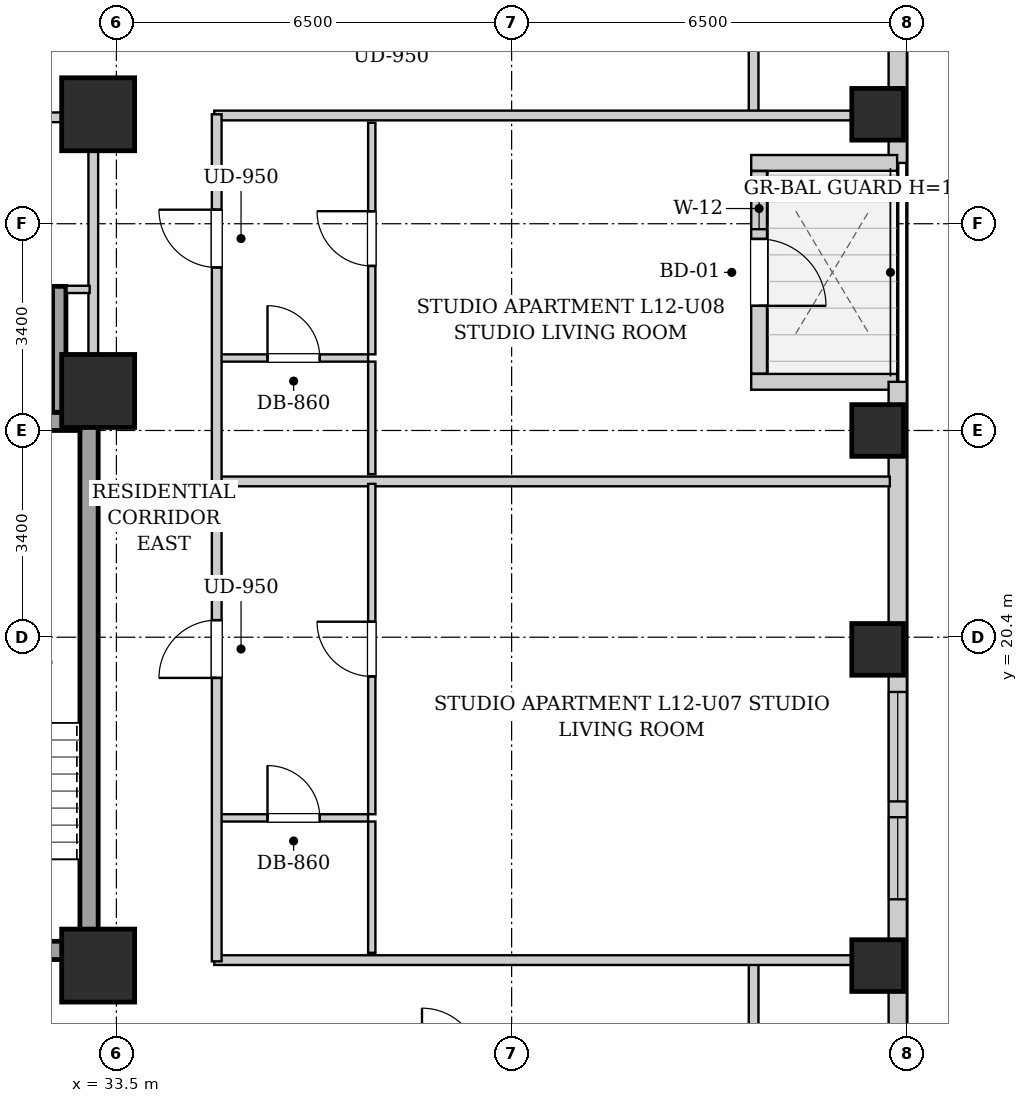
"""IFC4 building model, lengths in metres.
Left out: names, types, materials, properties, quantities, classifications, styles, units other than length and angle.
Written with IfcOpenShell. Run it as: python <this file> out.ifc"""

import sys

from ifc_helpers import new_model, si_unit, direction, frame, frame_2d, origin, origin_2d, place, context, subcontext, project, spatial, rectangle, extrude, element, fill, save


model = new_model("IFC4")
c1 = context("Model", 3, precision=1e-05, world=origin(), true_north=direction((0.0, 1.0)))
c2 = subcontext(c1, "Body", "Model", "MODEL_VIEW")
j1 = project(units=[si_unit("LENGTHUNIT", "METRE"), si_unit("PLANEANGLEUNIT", "RADIAN")], contexts=[c1])
p1 = place(None, origin())
s1 = spatial("IfcSite", under=j1, at=p1, CompositionType="ELEMENT")
p2 = place(p1, origin())
s2 = spatial("IfcBuilding", under=s1, at=p2, CompositionType="ELEMENT")
p3 = place(p2, frame((0.0, 0.0, 48.2)))
s3 = spatial("IfcBuildingStorey", under=s2, at=p3, CompositionType="ELEMENT", Elevation=48.2)
for number, where, z_axis, x_axis in (
    (1, (46.02, 15.0, 0.0), (0.0, 0.0, 1.0), (1.0, 0.0, 0.0)),
    (2, (46.02, 20.2, 0.0), (0.0, 0.0, 1.0), (1.0, 0.0, 0.0)),
    (3, (46.02, 23.8, 0.0), (0.0, 0.0, 1.0), (1.0, 0.0, 0.0)),
    (4, (46.02, 29.0, 0.0), (0.0, 0.0, 1.0), (1.0, 0.0, 0.0)),
):
    element("IfcColumn", number, at=place(p3, frame(where, z_axis=z_axis, x_axis=x_axis)), inside=s3, PredefinedType="COLUMN", context=c2, shape_type="SweptSolid", body=[
        extrude(rectangle(XDim=0.85, YDim=0.85, at=origin_2d()), origin(), (0.0, 0.0, 1.0), 3.2),
    ])
for number, where, z_axis, x_axis in (
    (5, (33.2, 15.0, 0.0), (0.0, 0.0, 1.0), (1.0, 0.0, 0.0)),
    (6, (33.2, 29.0, 0.0), (0.0, 0.0, 1.0), (1.0, 0.0, 0.0)),
    (7, (33.2, 24.45, 0.0), (0.0, 0.0, 1.0), (1.0, 0.0, 0.0)),
):
    element("IfcColumn", number, at=place(p3, frame(where, z_axis=z_axis, x_axis=x_axis)), inside=s3, PredefinedType="COLUMN", context=c2, shape_type="SweptSolid", body=[
        extrude(rectangle(XDim=1.2, YDim=1.2, at=origin_2d()), origin(), (0.0, 0.0, 1.0), 3.2),
    ])
p4 = place(p3, frame((46.35, 45.1, 0.0), z_axis=(0.0, 0.0, 1.0), x_axis=(0.0, -1.0, 0.0)))
e8 = element("IfcWall", 8, at=p4, inside=s3, PredefinedType="SOLIDWALL", context=c2, shape_type="SweptSolid", body=[
    extrude(rectangle(XDim=16.9, YDim=0.3, at=frame_2d((8.45, 0.0))), origin(), (0.0, 0.0, 1.0), 1.975),
])
p5 = place(p4, frame((3.715, 0.0, 0.55)))
e9 = element("IfcOpeningElement", 9, at=p5, cuts=e8, PredefinedType="OPENING", context=c2, shape_type="SweptSolid", body=[
    extrude(rectangle(XDim=1.8, YDim=1.2, at=frame_2d((0.9, 0.6))), frame((0.0, 0.16, 0.0), z_axis=(0.0, -1.0, 0.0), x_axis=(1.0, 0.0, 0.0)), (0.0, 0.0, 1.0), 0.32),
])
p6 = place(p4, frame((1.185, 0.0, 0.55)))
e10 = element("IfcOpeningElement", 10, at=p6, cuts=e8, PredefinedType="OPENING", context=c2, shape_type="SweptSolid", body=[
    extrude(rectangle(XDim=1.35, YDim=1.2, at=frame_2d((0.675, 0.6))), frame((0.0, 0.16, 0.0), z_axis=(0.0, -1.0, 0.0), x_axis=(1.0, 0.0, 0.0)), (0.0, 0.0, 1.0), 0.32),
])
p7 = place(p3, frame((46.34, 28.2, 0.0), z_axis=(0.0, 0.0, 1.0), x_axis=(-1.0, 0.0, 0.0)))
e11 = element("IfcWall", 11, at=p7, inside=s3, PredefinedType="SOLIDWALL", context=c2, shape_type="SweptSolid", body=[
    extrude(rectangle(XDim=2.4, YDim=0.26, at=frame_2d((1.2, 0.0))), origin(), (0.0, 0.0, 1.0), 2.94),
])
p8 = place(p3, frame((44.07, 28.066, 0.0), z_axis=(0.0, 0.0, 1.0), x_axis=(0.0, -1.0, 0.0)))
e12 = element("IfcWall", 12, at=p8, inside=s3, PredefinedType="SOLIDWALL", context=c2, shape_type="SweptSolid", body=[
    extrude(rectangle(XDim=3.332, YDim=0.26, at=frame_2d((1.666, 0.0))), origin(), (0.0, 0.0, 1.0), 2.94),
])
p9 = place(p8, frame((1.116, 0.0, 0.0)))
e13 = element("IfcOpeningElement", 13, at=p9, cuts=e12, PredefinedType="OPENING", context=c2, shape_type="SweptSolid", body=[
    extrude(rectangle(XDim=1.1, YDim=2.0, at=frame_2d((0.55, 1.0))), frame((0.0, 0.14, 0.0), z_axis=(0.0, -1.0, 0.0), x_axis=(1.0, 0.0, 0.0)), (0.0, 0.0, 1.0), 0.28),
])
p10 = place(p8, frame((0.276, 0.0, 0.55)))
e14 = element("IfcOpeningElement", 14, at=p10, cuts=e12, PredefinedType="OPENING", context=c2, shape_type="SweptSolid", body=[
    extrude(rectangle(XDim=0.68, YDim=1.2, at=frame_2d((0.34, 0.6))), frame((0.0, 0.14, 0.0), z_axis=(0.0, -1.0, 0.0), x_axis=(1.0, 0.0, 0.0)), (0.0, 0.0, 1.0), 0.28),
])
p11 = place(p3, frame((43.94, 24.6, 0.0), z_axis=(0.0, 0.0, 1.0), x_axis=(1.0, 0.0, 0.0)))
e15 = element("IfcWall", 15, at=p11, inside=s3, PredefinedType="SOLIDWALL", context=c2, shape_type="SweptSolid", body=[
    extrude(rectangle(XDim=2.4, YDim=0.26, at=frame_2d((1.2, 0.0))), origin(), (0.0, 0.0, 1.0), 2.94),
])
p12 = place(p3, frame((46.35, 24.6, 0.0), z_axis=(0.0, 0.0, 1.0), x_axis=(0.0, -1.0, 0.0)))
e16 = element("IfcWall", 16, at=p12, inside=s3, PredefinedType="SOLIDWALL", context=c2, shape_type="SweptSolid", body=[
    extrude(rectangle(XDim=22.1, YDim=0.3, at=frame_2d((11.05, 0.0))), origin(), (0.0, 0.0, 1.0), 1.975),
])
p13 = place(p12, frame((17.141, 0.0, 0.55)))
e17 = element("IfcOpeningElement", 17, at=p13, cuts=e16, PredefinedType="OPENING", context=c2, shape_type="SweptSolid", body=[
    extrude(rectangle(XDim=1.8, YDim=1.2, at=frame_2d((0.9, 0.6))), frame((0.0, 0.16, 0.0), z_axis=(0.0, -1.0, 0.0), x_axis=(1.0, 0.0, 0.0)), (0.0, 0.0, 1.0), 0.32),
])
p14 = place(p12, frame((14.465, 0.0, 0.55)))
e18 = element("IfcOpeningElement", 18, at=p14, cuts=e16, PredefinedType="OPENING", context=c2, shape_type="SweptSolid", body=[
    extrude(rectangle(XDim=1.35, YDim=1.2, at=frame_2d((0.675, 0.6))), frame((0.0, 0.16, 0.0), z_axis=(0.0, -1.0, 0.0), x_axis=(1.0, 0.0, 0.0)), (0.0, 0.0, 1.0), 0.32),
])
p15 = place(p12, frame((5.1, 0.0, 0.55)))
e19 = element("IfcOpeningElement", 19, at=p15, cuts=e16, PredefinedType="OPENING", context=c2, shape_type="SweptSolid", body=[
    extrude(rectangle(XDim=1.8, YDim=1.2, at=frame_2d((0.9, 0.6))), frame((0.0, 0.16, 0.0), z_axis=(0.0, -1.0, 0.0), x_axis=(1.0, 0.0, 0.0)), (0.0, 0.0, 1.0), 0.32),
])
p16 = place(p12, frame((7.16, 0.0, 0.55)))
e20 = element("IfcOpeningElement", 20, at=p16, cuts=e16, PredefinedType="OPENING", context=c2, shape_type="SweptSolid", body=[
    extrude(rectangle(XDim=1.35, YDim=1.2, at=frame_2d((0.675, 0.6))), frame((0.0, 0.16, 0.0), z_axis=(0.0, -1.0, 0.0), x_axis=(1.0, 0.0, 0.0)), (0.0, 0.0, 1.0), 0.32),
])
p17 = place(p3, frame((33.05, 15.1, 0.0), z_axis=(0.0, 0.0, 1.0), x_axis=(0.0, 1.0, 0.0)))
e21 = element("IfcWall", 21, at=p17, inside=s3, PredefinedType="SHEAR", context=c2, shape_type="SweptSolid", body=[
    extrude(rectangle(XDim=9.0, YDim=0.3, at=frame_2d((4.5, 0.0))), origin(), (0.0, 0.0, 1.0), 2.94),
])
p18 = place(p3, frame((30.05, 23.95, 0.0), z_axis=(0.0, 0.0, 1.0), x_axis=(1.0, 0.0, 0.0)))
e22 = element("IfcWall", 22, at=p18, inside=s3, PredefinedType="SHEAR", context=c2, shape_type="SweptSolid", body=[
    extrude(rectangle(XDim=2.85, YDim=0.3, at=frame_2d((1.425, 0.0))), origin(), (0.0, 0.0, 1.0), 2.94),
])
p19 = place(p3, frame((30.05, 15.25, 0.0), z_axis=(0.0, 0.0, 1.0), x_axis=(1.0, 0.0, 0.0)))
e23 = element("IfcWall", 23, at=p19, inside=s3, PredefinedType="SHEAR", context=c2, shape_type="SweptSolid", body=[
    extrude(rectangle(XDim=2.85, YDim=0.3, at=frame_2d((1.425, 0.0))), origin(), (0.0, 0.0, 1.0), 2.94),
])
p20 = place(p19, frame((0.86, 0.0, 0.0)))
e24 = element("IfcOpeningElement", 24, at=p20, cuts=e23, PredefinedType="OPENING", context=c2, shape_type="SweptSolid", body=[
    extrude(rectangle(XDim=1.1, YDim=2.05, at=frame_2d((0.55, 1.025))), frame((0.0, 0.16, 0.0), z_axis=(0.0, -1.0, 0.0), x_axis=(1.0, 0.0, 0.0)), (0.0, 0.0, 1.0), 0.32),
])
p21 = place(p3, frame((32.56, 24.1, 0.0), z_axis=(0.0, 0.0, 1.0), x_axis=(0.0, 1.0, 0.0)))
e25 = element("IfcWall", 25, at=p21, inside=s3, PredefinedType="SHEAR", context=c2, shape_type="SweptSolid", body=[
    extrude(rectangle(XDim=2.07, YDim=0.22, at=frame_2d((1.035, 0.0))), origin(), (0.0, 0.0, 1.0), 2.94),
])
p22 = place(p3, frame((33.12, 24.12, 0.0), z_axis=(0.0, 0.0, 1.0), x_axis=(0.0, 1.0, 0.0)))
e26 = element("IfcWall", 26, at=p22, inside=s3, PredefinedType="PARTITIONING", context=c2, shape_type="SweptSolid", body=[
    extrude(rectangle(XDim=4.76, YDim=0.16, at=frame_2d((2.38, 0.0))), origin(), (0.0, 0.0, 1.0), 2.275),
])
p23 = place(p3, frame((32.68, 26.12, 0.0), z_axis=(0.0, 0.0, 1.0), x_axis=(1.0, 0.0, 0.0)))
e27 = element("IfcWall", 27, at=p23, inside=s3, PredefinedType="PARTITIONING", context=c2, shape_type="SweptSolid", body=[
    extrude(rectangle(XDim=0.38, YDim=0.12, at=frame_2d((0.19, 0.0))), origin(), (0.0, 0.0, 1.0), 2.94),
])
p24 = place(p3, frame((30.08, 28.95, 0.0), z_axis=(0.0, 0.0, 1.0), x_axis=(1.0, 0.0, 0.0)))
e28 = element("IfcWall", 28, at=p24, inside=s3, PredefinedType="PARTITIONING", context=c2, shape_type="SweptSolid", body=[
    extrude(rectangle(XDim=2.96, YDim=0.16, at=frame_2d((1.48, 0.0))), origin(), (0.0, 0.0, 1.0), 2.94),
])
p25 = place(p24, frame((1.045, 0.0, 0.0)))
e29 = element("IfcOpeningElement", 29, at=p25, cuts=e28, PredefinedType="OPENING", context=c2, shape_type="SweptSolid", body=[
    extrude(rectangle(XDim=0.86, YDim=2.05, at=frame_2d((0.43, 1.025))), frame((0.0, 0.09, 0.0), z_axis=(0.0, -1.0, 0.0), x_axis=(1.0, 0.0, 0.0)), (0.0, 0.0, 1.0), 0.18),
])
for number, where, z_axis, x_axis in (
    (30, (43.98, 13.35, 0.0), (0.0, 0.0, 1.0), (0.0, 1.0, 0.0)),
    (31, (43.98, 28.98, 0.0), (0.0, 0.0, 1.0), (0.0, 1.0, 0.0)),
):
    element("IfcWall", number, at=place(p3, frame(where, z_axis=z_axis, x_axis=x_axis)), inside=s3, PredefinedType="PARTITIONING", context=c2, shape_type="SweptSolid", body=[
        extrude(rectangle(XDim=1.74, YDim=0.16, at=frame_2d((0.87, 0.0))), origin(), (0.0, 0.0, 1.0), 2.94),
    ])
for number, where, z_axis, x_axis in (
    (32, (35.11, 15.09, 0.0), (0.0, 0.0, 1.0), (1.0, 0.0, 0.0)),
    (33, (35.11, 28.98, 0.0), (0.0, 0.0, 1.0), (1.0, 0.0, 0.0)),
):
    element("IfcWall", number, at=place(p3, frame(where, z_axis=z_axis, x_axis=x_axis)), inside=s3, PredefinedType="PARTITIONING", context=c2, shape_type="SweptSolid", body=[
        extrude(rectangle(XDim=11.11, YDim=0.16, at=frame_2d((5.555, 0.0))), origin(), (0.0, 0.0, 1.0), 2.232),
    ])
p26 = place(p3, frame((35.19, 22.962, 0.0), z_axis=(0.0, 0.0, 1.0), x_axis=(1.0, 0.0, 0.0)))
e34 = element("IfcWall", 34, at=p26, inside=s3, PredefinedType="PARTITIONING", context=c2, shape_type="SweptSolid", body=[
    extrude(rectangle(XDim=11.03, YDim=0.16, at=frame_2d((5.515, 0.0))), origin(), (0.0, 0.0, 1.0), 2.94),
])
p27 = place(p3, frame((35.19, 17.429, 0.0), z_axis=(0.0, 0.0, 1.0), x_axis=(1.0, 0.0, 0.0)))
e35 = element("IfcWall", 35, at=p27, inside=s3, PredefinedType="PARTITIONING", context=c2, shape_type="SweptSolid", body=[
    extrude(rectangle(XDim=2.45, YDim=0.12, at=frame_2d((1.225, 0.0))), origin(), (0.0, 0.0, 1.0), 2.94),
])
p28 = place(p27, frame((0.795, 0.0, 0.0)))
e36 = element("IfcOpeningElement", 36, at=p28, cuts=e35, PredefinedType="OPENING", context=c2, shape_type="SweptSolid", body=[
    extrude(rectangle(XDim=0.86, YDim=2.05, at=frame_2d((0.43, 1.025))), frame((0.0, 0.07, 0.0), z_axis=(0.0, -1.0, 0.0), x_axis=(1.0, 0.0, 0.0)), (0.0, 0.0, 1.0), 0.14),
])
p29 = place(p3, frame((37.7, 15.21, 0.0), z_axis=(0.0, 0.0, 1.0), x_axis=(0.0, 1.0, 0.0)))
e37 = element("IfcWall", 37, at=p29, inside=s3, PredefinedType="PARTITIONING", context=c2, shape_type="SweptSolid", body=[
    extrude(rectangle(XDim=2.159, YDim=0.12, at=frame_2d((1.08, 0.0))), origin(), (0.0, 0.0, 1.0), 2.94),
])
p30 = place(p3, frame((37.7, 17.489, 0.0), z_axis=(0.0, 0.0, 1.0), x_axis=(0.0, 1.0, 0.0)))
e38 = element("IfcWall", 38, at=p30, inside=s3, PredefinedType="PARTITIONING", context=c2, shape_type="SweptSolid", body=[
    extrude(rectangle(XDim=5.433, YDim=0.12, at=frame_2d((2.717, 0.0))), origin(), (0.0, 0.0, 1.0), 2.94),
])
p31 = place(p30, frame((2.266, 0.0, 0.0)))
e39 = element("IfcOpeningElement", 39, at=p31, cuts=e38, PredefinedType="OPENING", context=c2, shape_type="SweptSolid", body=[
    extrude(rectangle(XDim=0.9, YDim=2.05, at=frame_2d((0.45, 1.025))), frame((0.0, 0.07, 0.0), z_axis=(0.0, -1.0, 0.0), x_axis=(1.0, 0.0, 0.0)), (0.0, 0.0, 1.0), 0.14),
])
p32 = place(p3, frame((35.19, 24.992, 0.0), z_axis=(0.0, 0.0, 1.0), x_axis=(1.0, 0.0, 0.0)))
e40 = element("IfcWall", 40, at=p32, inside=s3, PredefinedType="PARTITIONING", context=c2, shape_type="SweptSolid", body=[
    extrude(rectangle(XDim=2.45, YDim=0.12, at=frame_2d((1.225, 0.0))), origin(), (0.0, 0.0, 1.0), 2.94),
])
p33 = place(p32, frame((0.795, 0.0, 0.0)))
e41 = element("IfcOpeningElement", 41, at=p33, cuts=e40, PredefinedType="OPENING", context=c2, shape_type="SweptSolid", body=[
    extrude(rectangle(XDim=0.86, YDim=2.05, at=frame_2d((0.43, 1.025))), frame((0.0, 0.07, 0.0), z_axis=(0.0, -1.0, 0.0), x_axis=(1.0, 0.0, 0.0)), (0.0, 0.0, 1.0), 0.14),
])
p34 = place(p3, frame((37.7, 23.082, 0.0), z_axis=(0.0, 0.0, 1.0), x_axis=(0.0, 1.0, 0.0)))
e42 = element("IfcWall", 42, at=p34, inside=s3, PredefinedType="PARTITIONING", context=c2, shape_type="SweptSolid", body=[
    extrude(rectangle(XDim=1.85, YDim=0.12, at=frame_2d((0.925, 0.0))), origin(), (0.0, 0.0, 1.0), 2.94),
])
p35 = place(p3, frame((37.7, 25.052, 0.0), z_axis=(0.0, 0.0, 1.0), x_axis=(0.0, 1.0, 0.0)))
e43 = element("IfcWall", 43, at=p35, inside=s3, PredefinedType="PARTITIONING", context=c2, shape_type="SweptSolid", body=[
    extrude(rectangle(XDim=3.808, YDim=0.12, at=frame_2d((1.904, 0.0))), origin(), (0.0, 0.0, 1.0), 2.94),
])
p36 = place(p35, frame((1.454, 0.0, 0.0)))
e44 = element("IfcOpeningElement", 44, at=p36, cuts=e43, PredefinedType="OPENING", context=c2, shape_type="SweptSolid", body=[
    extrude(rectangle(XDim=0.9, YDim=2.05, at=frame_2d((0.45, 1.025))), frame((0.0, 0.07, 0.0), z_axis=(0.0, -1.0, 0.0), x_axis=(1.0, 0.0, 0.0)), (0.0, 0.0, 1.0), 0.14),
])
p37 = place(p3, frame((35.15, 15.07, 0.0), z_axis=(0.0, 0.0, 1.0), x_axis=(0.0, 1.0, 0.0)))
e45 = element("IfcWall", 45, at=p37, inside=s3, PredefinedType="PARTITIONING", context=c2, shape_type="SweptSolid", body=[
    extrude(rectangle(XDim=13.93, YDim=0.16, at=frame_2d((6.965, 0.0))), origin(), (0.0, 0.0, 1.0), 2.94),
])
p38 = place(p37, frame((4.661, 0.0, 0.0)))
e46 = element("IfcOpeningElement", 46, at=p38, cuts=e45, PredefinedType="OPENING", context=c2, shape_type="SweptSolid", body=[
    extrude(rectangle(XDim=0.95, YDim=2.1, at=frame_2d((0.475, 1.05))), frame((0.0, 0.09, 0.0), z_axis=(0.0, -1.0, 0.0), x_axis=(1.0, 0.0, 0.0)), (0.0, 0.0, 1.0), 0.18),
])
p39 = place(p37, frame((11.411, 0.0, 0.0)))
e47 = element("IfcOpeningElement", 47, at=p39, cuts=e45, PredefinedType="OPENING", context=c2, shape_type="SweptSolid", body=[
    extrude(rectangle(XDim=0.95, YDim=2.1, at=frame_2d((0.475, 1.05))), frame((0.0, 0.09, 0.0), z_axis=(0.0, -1.0, 0.0), x_axis=(1.0, 0.0, 0.0)), (0.0, 0.0, 1.0), 0.18),
])
p40 = place(p28, origin())
e48 = element("IfcDoor", 48, at=p40, inside=s3, OperationType="SINGLE_SWING_LEFT", PredefinedType="DOOR", context=c2, shape_type="SweptSolid", body=[
    extrude(rectangle(XDim=0.86, YDim=2.05, at=frame_2d((0.43, 1.025))), frame((0.0, 0.025, 0.0), z_axis=(0.0, -1.0, 0.0), x_axis=(1.0, 0.0, 0.0)), (0.0, 0.0, 1.0), 0.05),
])
fill(e36, e48)
p41 = place(p31, origin())
e49 = element("IfcDoor", 49, at=p41, inside=s3, OperationType="SINGLE_SWING_RIGHT", PredefinedType="DOOR", context=c2, shape_type="SweptSolid", body=[
    extrude(rectangle(XDim=0.9, YDim=2.05, at=frame_2d((0.45, 1.025))), frame((0.0, 0.025, 0.0), z_axis=(0.0, -1.0, 0.0), x_axis=(1.0, 0.0, 0.0)), (0.0, 0.0, 1.0), 0.05),
])
fill(e39, e49)
p42 = place(p33, origin())
e50 = element("IfcDoor", 50, at=p42, inside=s3, OperationType="SINGLE_SWING_LEFT", PredefinedType="DOOR", context=c2, shape_type="SweptSolid", body=[
    extrude(rectangle(XDim=0.86, YDim=2.05, at=frame_2d((0.43, 1.025))), frame((0.0, 0.025, 0.0), z_axis=(0.0, -1.0, 0.0), x_axis=(1.0, 0.0, 0.0)), (0.0, 0.0, 1.0), 0.05),
])
fill(e41, e50)
p43 = place(p36, origin())
e51 = element("IfcDoor", 51, at=p43, inside=s3, OperationType="SINGLE_SWING_RIGHT", PredefinedType="DOOR", context=c2, shape_type="SweptSolid", body=[
    extrude(rectangle(XDim=0.9, YDim=2.05, at=frame_2d((0.45, 1.025))), frame((0.0, 0.025, 0.0), z_axis=(0.0, -1.0, 0.0), x_axis=(1.0, 0.0, 0.0)), (0.0, 0.0, 1.0), 0.05),
])
fill(e44, e51)
p44 = place(p38, origin())
e52 = element("IfcDoor", 52, at=p44, inside=s3, OperationType="SINGLE_SWING_LEFT", PredefinedType="DOOR", context=c2, shape_type="SweptSolid", body=[
    extrude(rectangle(XDim=0.95, YDim=2.1, at=frame_2d((0.475, 1.05))), frame((0.0, 0.025, 0.0), z_axis=(0.0, -1.0, 0.0), x_axis=(1.0, 0.0, 0.0)), (0.0, 0.0, 1.0), 0.05),
])
fill(e46, e52)
p45 = place(p39, origin())
e53 = element("IfcDoor", 53, at=p45, inside=s3, OperationType="SINGLE_SWING_RIGHT", PredefinedType="DOOR", context=c2, shape_type="SweptSolid", body=[
    extrude(rectangle(XDim=0.95, YDim=2.1, at=frame_2d((0.475, 1.05))), frame((0.0, 0.025, 0.0), z_axis=(0.0, -1.0, 0.0), x_axis=(1.0, 0.0, 0.0)), (0.0, 0.0, 1.0), 0.05),
])
fill(e47, e53)
p46 = place(p9, origin())
e54 = element("IfcDoor", 54, at=p46, inside=s3, OperationType="SINGLE_SWING_RIGHT", PredefinedType="DOOR", context=c2, shape_type="SweptSolid", body=[
    extrude(rectangle(XDim=1.1, YDim=2.0, at=frame_2d((0.55, 1.0))), frame((0.0, 0.025, 0.0), z_axis=(0.0, -1.0, 0.0), x_axis=(1.0, 0.0, 0.0)), (0.0, 0.0, 1.0), 0.05),
])
fill(e13, e54)
p47 = place(p15, origin())
e55 = element("IfcWindow", 55, at=p47, inside=s3, PartitioningType="DOUBLE_PANEL_VERTICAL", PredefinedType="WINDOW", context=c2, shape_type="SweptSolid", body=[
    extrude(rectangle(XDim=1.8, YDim=1.2, at=frame_2d((0.9, 0.6))), frame((0.0, 0.03, 0.0), z_axis=(0.0, -1.0, 0.0), x_axis=(1.0, 0.0, 0.0)), (0.0, 0.0, 1.0), 0.06),
])
fill(e19, e55)
p48 = place(p16, origin())
e56 = element("IfcWindow", 56, at=p48, inside=s3, PartitioningType="SINGLE_PANEL", PredefinedType="WINDOW", context=c2, shape_type="SweptSolid", body=[
    extrude(rectangle(XDim=1.35, YDim=1.2, at=frame_2d((0.675, 0.6))), frame((0.0, 0.03, 0.0), z_axis=(0.0, -1.0, 0.0), x_axis=(1.0, 0.0, 0.0)), (0.0, 0.0, 1.0), 0.06),
])
fill(e20, e56)
p49 = place(p10, origin())
e57 = element("IfcWindow", 57, at=p49, inside=s3, PartitioningType="SINGLE_PANEL", PredefinedType="WINDOW", context=c2, shape_type="SweptSolid", body=[
    extrude(rectangle(XDim=0.68, YDim=1.2, at=frame_2d((0.34, 0.6))), frame((0.0, 0.03, 0.0), z_axis=(0.0, -1.0, 0.0), x_axis=(1.0, 0.0, 0.0)), (0.0, 0.0, 1.0), 0.06),
])
fill(e14, e57)
save(model, sys.argv[1])
